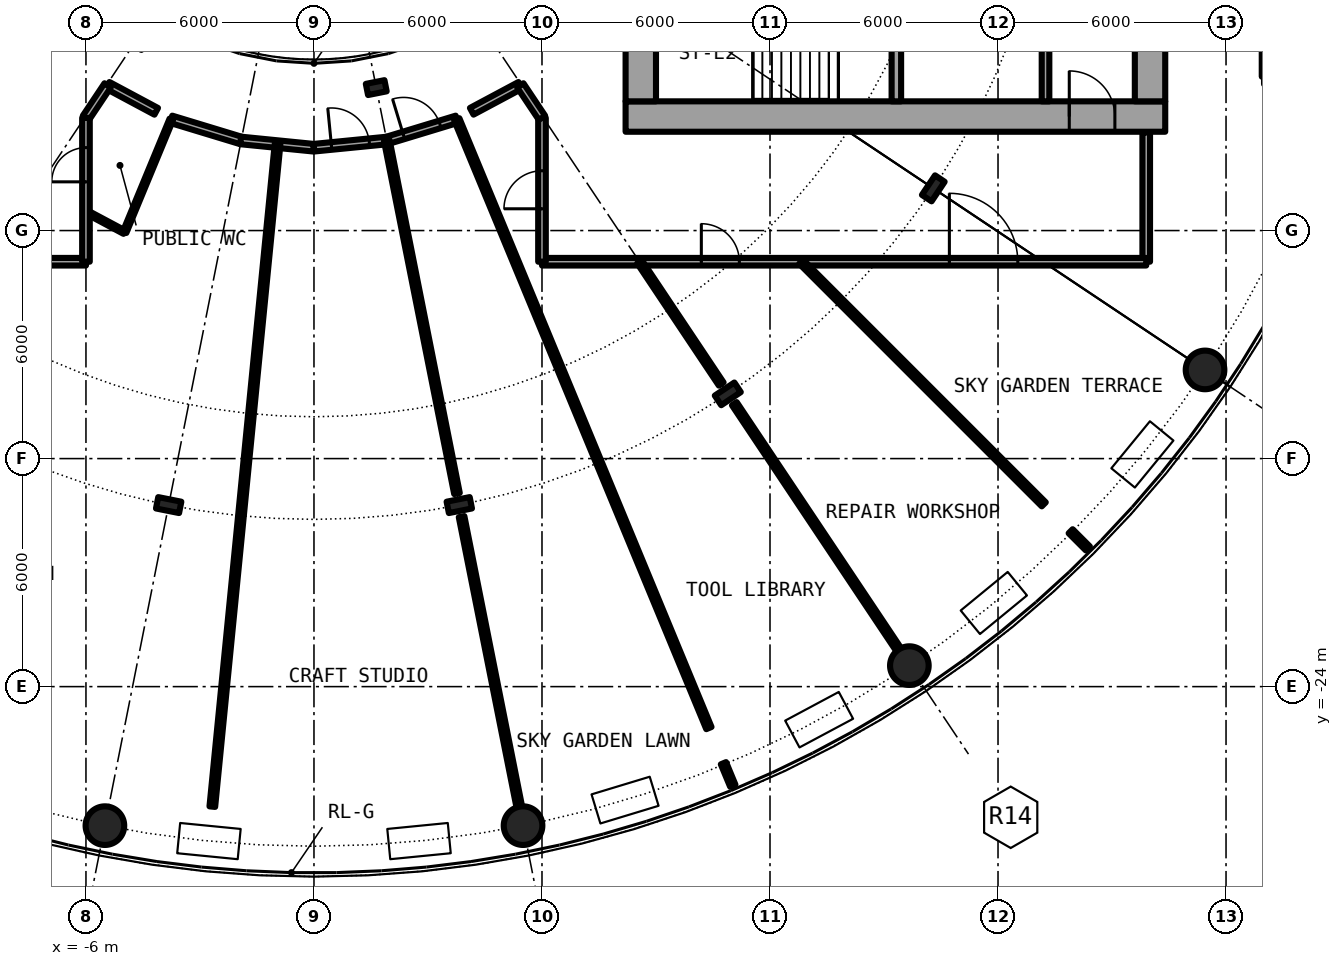
"""IFC4 building model, lengths in metres.
Left out: names, types, materials, properties, quantities, classifications, styles, units other than length and angle.
Written with IfcOpenShell. Run it as: python <this file> out.ifc"""

import sys

from ifc_helpers import new_model, si_unit, direction, frame, frame_2d, origin, origin_2d, place, context, subcontext, project, spatial, rectangle, hollow_circle, i_section, extrude, element, fill, save


model = new_model("IFC4")
c1 = context("Model", 3, precision=1e-05, world=origin(), true_north=direction((0.0, 1.0)))
c2 = subcontext(c1, "Body", "Model", "MODEL_VIEW")
j1 = project(units=[si_unit("LENGTHUNIT", "METRE"), si_unit("PLANEANGLEUNIT", "RADIAN")], contexts=[c1])
p1 = place(None, origin())
s1 = spatial("IfcSite", under=j1, at=p1, CompositionType="ELEMENT")
p2 = place(p1, origin())
s2 = spatial("IfcBuilding", under=s1, at=p2, CompositionType="ELEMENT")
p3 = place(p2, frame((0.0, 0.0, 57.5)))
s3 = spatial("IfcBuildingStorey", under=s2, at=p3, CompositionType="ELEMENT", Elevation=57.5)
for number, where, z_axis, x_axis in (
    (1, (-5.501, -27.658, 0.0), (0.0, 0.0, 1.0), (1.0, 0.0, 0.0)),
    (2, (5.501, -27.658, 0.0), (0.0, 0.0, 1.0), (1.0, 0.0, 0.0)),
    (3, (15.667, -23.448, 0.0), (0.0, 0.0, 1.0), (1.0, 0.0, 0.0)),
    (4, (23.448, -15.667, 0.0), (0.0, 0.0, 1.0), (1.0, 0.0, 0.0)),
):
    element("IfcColumn", number, at=place(p3, frame(where, z_axis=z_axis, x_axis=x_axis)), inside=s3, PredefinedType="COLUMN", context=c2, shape_type="SweptSolid", body=[
        extrude(hollow_circle(Radius=0.508, WallThickness=0.05, at=origin_2d()), origin(), (0.0, 0.0, 1.0), 6.1),
    ])
for number, where, z_axis, x_axis in (
    (5, (-3.824, -19.223, 0.0), (0.0, 0.0, 1.0), (-0.195, -0.981, 0.0)),
    (6, (3.824, -19.223, 0.0), (0.0, 0.0, 1.0), (0.195, -0.981, 0.0)),
    (7, (10.889, -16.297, 0.0), (0.0, 0.0, 1.0), (0.556, -0.831, 0.0)),
    (8, (16.297, -10.889, 0.0), (0.0, 0.0, 1.0), (0.831, -0.556, 0.0)),
):
    element("IfcColumn", number, at=place(p3, frame(where, z_axis=z_axis, x_axis=x_axis)), inside=s3, PredefinedType="COLUMN", context=c2, shape_type="SweptSolid", body=[
        extrude(i_section(OverallWidth=0.305, OverallDepth=0.62, WebThickness=0.021, FlangeThickness=0.04, FilletRadius=0.027, at=origin_2d()), origin(), (0.0, 0.0, 1.0), 6.1),
    ])
p4 = place(p3, frame((1.639, -8.239, 0.0), z_axis=(0.0, 0.0, 1.0), x_axis=(0.195090322016, -0.980785280403, 0.0)))
e9 = element("IfcColumn", 9, at=p4, inside=s3, PredefinedType="COLUMN", context=c2, shape_type="SweptSolid", body=[
    extrude(i_section(OverallWidth=0.3, OverallDepth=0.5, WebThickness=0.014, FlangeThickness=0.028, FilletRadius=0.027, at=origin_2d()), origin(), (0.0, 0.0, 1.0), 6.1),
])
p5 = place(p3, frame((8.2, -9.0, 0.0), z_axis=(0.0, 0.0, 1.0), x_axis=(1.0, 0.0, 0.0)))
e10 = element("IfcWall", 10, at=p5, inside=s3, PredefinedType="SHEAR", context=c2, shape_type="SweptSolid", body=[
    extrude(rectangle(XDim=14.2, YDim=0.8, at=frame_2d((7.1, 0.0))), origin(), (0.0, 0.0, 1.0), 6.1),
])
p6 = place(p5, frame((11.675, 0.0, 0.0)))
e11 = element("IfcOpeningElement", 11, at=p6, cuts=e10, PredefinedType="OPENING", context=c2, shape_type="SweptSolid", body=[
    extrude(rectangle(XDim=1.2, YDim=2.3, at=frame_2d((0.6, 1.15))), frame((0.0, 0.41, 0.0), z_axis=(0.0, -1.0, 0.0), x_axis=(1.0, 0.0, 0.0)), (0.0, 0.0, 1.0), 0.82),
])
p7 = place(p3, frame((22.0, 8.6, 0.0), z_axis=(0.0, 0.0, 1.0), x_axis=(0.0, -1.0, 0.0)))
e12 = element("IfcWall", 12, at=p7, inside=s3, PredefinedType="SHEAR", context=c2, shape_type="SweptSolid", body=[
    extrude(rectangle(XDim=17.2, YDim=0.8, at=frame_2d((8.6, 0.0))), origin(), (0.0, 0.0, 1.0), 6.1),
])
p8 = place(p7, frame((7.4, 0.0, 0.0)))
e13 = element("IfcOpeningElement", 13, at=p8, cuts=e12, PredefinedType="OPENING", context=c2, shape_type="SweptSolid", body=[
    extrude(rectangle(XDim=2.4, YDim=2.3, at=frame_2d((1.2, 1.15))), frame((0.0, 0.41, 0.0), z_axis=(0.0, -1.0, 0.0), x_axis=(1.0, 0.0, 0.0)), (0.0, 0.0, 1.0), 0.82),
])
p9 = place(p3, frame((8.6, -8.6, 0.0), z_axis=(0.0, 0.0, 1.0), x_axis=(0.0, 1.0, 0.0)))
e14 = element("IfcWall", 14, at=p9, inside=s3, PredefinedType="SHEAR", context=c2, shape_type="SweptSolid", body=[
    extrude(rectangle(XDim=17.2, YDim=0.8, at=frame_2d((8.6, 0.0))), origin(), (0.0, 0.0, 1.0), 6.1),
])
p10 = place(p9, frame((7.4, 0.0, 0.1)))
e15 = element("IfcOpeningElement", 15, at=p10, cuts=e14, PredefinedType="OPENING", context=c2, shape_type="SweptSolid", body=[
    extrude(rectangle(XDim=2.4, YDim=2.2, at=frame_2d((1.2, 1.1))), frame((0.0, 0.41, 0.0), z_axis=(0.0, -1.0, 0.0), x_axis=(1.0, 0.0, 0.0)), (0.0, 0.0, 1.0), 0.82),
])
p11 = place(p3, frame((15.325, -8.6, 0.0), z_axis=(0.0, 0.0, 1.0), x_axis=(0.0, 1.0, 0.0)))
e16 = element("IfcWall", 16, at=p11, inside=s3, PredefinedType="SHEAR", context=c2, shape_type="SweptSolid", body=[
    extrude(rectangle(XDim=3.95, YDim=0.25, at=frame_2d((1.975, 0.0))), origin(), (0.0, 0.0, 1.0), 6.1),
])
p12 = place(p11, frame((2.025, 0.0, 0.0)))
e17 = element("IfcOpeningElement", 17, at=p12, cuts=e16, PredefinedType="OPENING", context=c2, shape_type="SweptSolid", body=[
    extrude(rectangle(XDim=1.2, YDim=2.3, at=frame_2d((0.6, 1.15))), frame((0.0, 0.135, 0.0), z_axis=(0.0, -1.0, 0.0), x_axis=(1.0, 0.0, 0.0)), (0.0, 0.0, 1.0), 0.27),
])
p13 = place(p3, frame((19.25, -8.6, 0.0), z_axis=(0.0, 0.0, 1.0), x_axis=(0.0, 1.0, 0.0)))
e18 = element("IfcWall", 18, at=p13, inside=s3, PredefinedType="SOLIDWALL", context=c2, shape_type="SweptSolid", body=[
    extrude(rectangle(XDim=7.025, YDim=0.2, at=frame_2d((3.513, 0.0))), origin(), (0.0, 0.0, 1.0), 5.75),
])
p14 = place(p13, frame((2.35, 0.0, 0.0)))
e19 = element("IfcOpeningElement", 19, at=p14, cuts=e18, PredefinedType="OPENING", context=c2, shape_type="SweptSolid", body=[
    extrude(rectangle(XDim=1.1, YDim=2.3, at=frame_2d((0.55, 1.15))), frame((0.0, 0.11, 0.0), z_axis=(0.0, -1.0, 0.0), x_axis=(1.0, 0.0, 0.0)), (0.0, 0.0, 1.0), 0.22),
])
p15 = place(p3, frame((25.0, -3.5, 0.0), z_axis=(0.0, 0.0, 1.0), x_axis=(0.0, -1.0, 0.0)))
e20 = element("IfcWall", 20, at=p15, inside=s3, PredefinedType="PARTITIONING", context=c2, shape_type="SweptSolid", body=[
    extrude(rectangle(XDim=4.45, YDim=0.12, at=frame_2d((2.225, 0.0))), origin(), (0.0, 0.0, 1.0), 5.75),
])
p16 = place(p15, frame((0.4, 0.0, 0.1)))
e21 = element("IfcOpeningElement", 21, at=p16, cuts=e20, PredefinedType="OPENING", context=c2, shape_type="SweptSolid", body=[
    extrude(rectangle(XDim=3.6, YDim=5.4, at=frame_2d((1.8, 2.7))), frame((0.0, 0.07, 0.0), z_axis=(0.0, -1.0, 0.0), x_axis=(1.0, 0.0, 0.0)), (0.0, 0.0, 1.0), 0.14),
])
p17 = place(p3, frame((21.9, -12.82, 0.0), z_axis=(0.0, 0.0, 1.0), x_axis=(0.0, 1.0, 0.0)))
e22 = element("IfcWall", 22, at=p17, inside=s3, PredefinedType="PARTITIONING", context=c2, shape_type="SweptSolid", body=[
    extrude(rectangle(XDim=3.4, YDim=0.2, at=frame_2d((1.7, 0.0))), origin(), (0.0, 0.0, 1.0), 5.75),
])
p18 = place(p3, frame((-6.0, -11.503, 0.0), z_axis=(0.0, 0.0, 1.0), x_axis=(0.882235076446, -0.470809165042, 0.0)))
e23 = element("IfcWall", 23, at=p18, inside=s3, PredefinedType="PARTITIONING", context=c2, shape_type="SweptSolid", body=[
    extrude(rectangle(XDim=1.147, YDim=0.1, at=frame_2d((0.573, 0.0))), origin(), (0.0, 0.0, 1.0), 5.75),
])
p19 = place(p3, frame((-21.9, -12.82, 0.0), z_axis=(0.0, 0.0, 1.0), x_axis=(1.0, 0.0, 0.0)))
e24 = element("IfcWall", 24, at=p19, inside=s3, PredefinedType="PARTITIONING", context=c2, shape_type="SweptSolid", body=[
    extrude(rectangle(XDim=15.9, YDim=0.2, at=frame_2d((7.95, 0.0))), origin(), (0.0, 0.0, 1.0), 5.75),
])
p20 = place(p19, frame((11.99, 0.0, 0.0)))
e25 = element("IfcOpeningElement", 25, at=p20, cuts=e24, PredefinedType="OPENING", context=c2, shape_type="SweptSolid", body=[
    extrude(rectangle(XDim=1.0, YDim=2.3, at=frame_2d((0.5, 1.15))), frame((0.0, 0.11, 0.0), z_axis=(0.0, -1.0, 0.0), x_axis=(1.0, 0.0, 0.0)), (0.0, 0.0, 1.0), 0.22),
])
p21 = place(p19, frame((3.464, 0.0, 0.0)))
e26 = element("IfcOpeningElement", 26, at=p21, cuts=e24, PredefinedType="OPENING", context=c2, shape_type="SweptSolid", body=[
    extrude(rectangle(XDim=1.8, YDim=2.3, at=frame_2d((0.9, 1.15))), frame((0.0, 0.11, 0.0), z_axis=(0.0, -1.0, 0.0), x_axis=(1.0, 0.0, 0.0)), (0.0, 0.0, 1.0), 0.22),
])
p22 = place(p3, frame((6.0, -12.82, 0.0), z_axis=(0.0, 0.0, 1.0), x_axis=(1.0, 0.0, 0.0)))
e27 = element("IfcWall", 27, at=p22, inside=s3, PredefinedType="PARTITIONING", context=c2, shape_type="SweptSolid", body=[
    extrude(rectangle(XDim=15.9, YDim=0.2, at=frame_2d((7.95, 0.0))), origin(), (0.0, 0.0, 1.0), 5.75),
])
p23 = place(p22, frame((4.193, 0.0, 0.0)))
e28 = element("IfcOpeningElement", 28, at=p23, cuts=e27, PredefinedType="OPENING", context=c2, shape_type="SweptSolid", body=[
    extrude(rectangle(XDim=1.0, YDim=2.3, at=frame_2d((0.5, 1.15))), frame((0.0, 0.11, 0.0), z_axis=(0.0, -1.0, 0.0), x_axis=(1.0, 0.0, 0.0)), (0.0, 0.0, 1.0), 0.22),
])
p24 = place(p22, frame((10.72, 0.0, 0.0)))
e29 = element("IfcOpeningElement", 29, at=p24, cuts=e27, PredefinedType="OPENING", context=c2, shape_type="SweptSolid", body=[
    extrude(rectangle(XDim=1.8, YDim=2.3, at=frame_2d((0.9, 1.15))), frame((0.0, 0.11, 0.0), z_axis=(0.0, -1.0, 0.0), x_axis=(1.0, 0.0, 0.0)), (0.0, 0.0, 1.0), 0.22),
])
p25 = place(p3, frame((-5.429, -8.179, 0.0), z_axis=(0.0, 0.0, 1.0), x_axis=(0.881652665802, -0.471898905364, 0.0)))
e30 = element("IfcWall", 30, at=p25, inside=s3, PredefinedType="PARTITIONING", context=c2, shape_type="SweptSolid", body=[
    extrude(rectangle(XDim=1.45, YDim=0.2, at=frame_2d((0.725, 0.0))), origin(), (0.0, 0.0, 1.0), 5.75),
])
p26 = place(p3, frame((-3.758, -9.072, 0.0), z_axis=(0.0, 0.0, 1.0), x_axis=(0.956896312675, -0.29042976223, 0.0)))
e31 = element("IfcWall", 31, at=p26, inside=s3, PredefinedType="PARTITIONING", context=c2, shape_type="SweptSolid", body=[
    extrude(rectangle(XDim=1.925, YDim=0.2, at=frame_2d((0.962, 0.0))), origin(), (0.0, 0.0, 1.0), 5.75),
])
p27 = place(p3, frame((-1.929, -9.629, 0.0), z_axis=(0.0, 0.0, 1.0), x_axis=(0.995059761059, -0.09927775139, 0.0)))
e32 = element("IfcWall", 32, at=p27, inside=s3, PredefinedType="PARTITIONING", context=c2, shape_type="SweptSolid", body=[
    extrude(rectangle(XDim=1.926, YDim=0.2, at=frame_2d((0.963, 0.0))), origin(), (0.0, 0.0, 1.0), 5.75),
])
p28 = place(p3, frame((0.0, -9.82, 0.0), z_axis=(0.0, 0.0, 1.0), x_axis=(0.995171860647, 0.098147683504, 0.0)))
e33 = element("IfcWall", 33, at=p28, inside=s3, PredefinedType="PARTITIONING", context=c2, shape_type="SweptSolid", body=[
    extrude(rectangle(XDim=1.925, YDim=0.2, at=frame_2d((0.963, 0.0))), origin(), (0.0, 0.0, 1.0), 5.75),
])
p29 = place(p28, frame((0.463, 0.0, 0.0)))
e34 = element("IfcOpeningElement", 34, at=p29, cuts=e33, PredefinedType="OPENING", context=c2, shape_type="SweptSolid", body=[
    extrude(rectangle(XDim=1.0, YDim=2.3, at=frame_2d((0.5, 1.15))), frame((0.0, 0.11, 0.0), z_axis=(0.0, -1.0, 0.0), x_axis=(1.0, 0.0, 0.0)), (0.0, 0.0, 1.0), 0.22),
])
p30 = place(p3, frame((1.916, -9.631, 0.0), z_axis=(0.0, 0.0, 1.0), x_axis=(0.956896312675, 0.29042976223, 0.0)))
e35 = element("IfcWall", 35, at=p30, inside=s3, PredefinedType="PARTITIONING", context=c2, shape_type="SweptSolid", body=[
    extrude(rectangle(XDim=1.925, YDim=0.2, at=frame_2d((0.962, 0.0))), origin(), (0.0, 0.0, 1.0), 5.75),
])
p31 = place(p30, frame((0.462, 0.0, 0.0)))
e36 = element("IfcOpeningElement", 36, at=p31, cuts=e35, PredefinedType="OPENING", context=c2, shape_type="SweptSolid", body=[
    extrude(rectangle(XDim=1.0, YDim=2.3, at=frame_2d((0.5, 1.15))), frame((0.0, 0.11, 0.0), z_axis=(0.0, -1.0, 0.0), x_axis=(1.0, 0.0, 0.0)), (0.0, 0.0, 1.0), 0.22),
])
p32 = place(p3, frame((4.151, -8.862, 0.0), z_axis=(0.0, 0.0, 1.0), x_axis=(0.88193287619, 0.471375011954, 0.0)))
e37 = element("IfcWall", 37, at=p32, inside=s3, PredefinedType="PARTITIONING", context=c2, shape_type="SweptSolid", body=[
    extrude(rectangle(XDim=1.449, YDim=0.2, at=frame_2d((0.725, 0.0))), origin(), (0.0, 0.0, 1.0), 5.75),
])
p33 = place(p3, frame((6.0, -12.82, 0.0), z_axis=(0.0, 0.0, 1.0), x_axis=(0.0, 1.0, 0.0)))
e38 = element("IfcWall", 38, at=p33, inside=s3, PredefinedType="PARTITIONING", context=c2, shape_type="SweptSolid", body=[
    extrude(rectangle(XDim=3.786, YDim=0.2, at=frame_2d((1.893, 0.0))), origin(), (0.0, 0.0, 1.0), 5.75),
])
p34 = place(p33, frame((1.393, 0.0, 0.0)))
e39 = element("IfcOpeningElement", 39, at=p34, cuts=e38, PredefinedType="OPENING", context=c2, shape_type="SweptSolid", body=[
    extrude(rectangle(XDim=1.0, YDim=2.3, at=frame_2d((0.5, 1.15))), frame((0.0, 0.11, 0.0), z_axis=(0.0, -1.0, 0.0), x_axis=(1.0, 0.0, 0.0)), (0.0, 0.0, 1.0), 0.22),
])
for number, where, z_axis, x_axis in (
    (40, (-6.0, -9.034, 0.0), (0.0, 0.0, 1.0), (0.555, 0.832, 0.0)),
    (41, (5.429, -8.179, 0.0), (0.0, 0.0, 1.0), (0.555, -0.832, 0.0)),
):
    element("IfcWall", number, at=place(p3, frame(where, z_axis=z_axis, x_axis=x_axis)), inside=s3, PredefinedType="PARTITIONING", context=c2, shape_type="SweptSolid", body=[
        extrude(rectangle(XDim=1.028, YDim=0.2, at=frame_2d((0.514, 0.0))), origin(), (0.0, 0.0, 1.0), 5.75),
    ])
p35 = place(p3, frame((-4.984, -12.045, 0.0), z_axis=(0.0, 0.0, 1.0), x_axis=(0.382517205945, 0.923948368231, 0.0)))
e42 = element("IfcWall", 42, at=p35, inside=s3, PredefinedType="PARTITIONING", context=c2, shape_type="SweptSolid", body=[
    extrude(rectangle(XDim=3.216, YDim=0.1, at=frame_2d((1.608, 0.0))), origin(), (0.0, 0.0, 1.0), 5.75),
])
p36 = place(p3, frame((-2.675, -27.158, 0.0), z_axis=(0.0, 0.0, 1.0), x_axis=(0.098025634079, 0.995183890074, 0.0)))
e43 = element("IfcWall", 43, at=p36, inside=s3, PredefinedType="PARTITIONING", context=c2, shape_type="SweptSolid", body=[
    extrude(rectangle(XDim=17.516, YDim=0.15, at=frame_2d((8.758, 0.0))), origin(), (0.0, 0.0, 1.0), 5.75),
])
p37 = place(p3, frame((1.916, -9.631, 0.0), z_axis=(0.0, 0.0, 1.0), x_axis=(0.195035186511, -0.980796245926, 0.0)))
e44 = element("IfcWall", 44, at=p37, inside=s3, PredefinedType="PARTITIONING", context=c2, shape_type="SweptSolid", body=[
    extrude(rectangle(XDim=9.47, YDim=0.15, at=frame_2d((4.735, 0.0))), origin(), (0.0, 0.0, 1.0), 5.75),
])
p38 = place(p3, frame((3.757, -9.072, 0.0), z_axis=(0.0, 0.0, 1.0), x_axis=(0.382668905709, -0.923885549516, 0.0)))
e45 = element("IfcWall", 45, at=p38, inside=s3, PredefinedType="PARTITIONING", context=c2, shape_type="SweptSolid", body=[
    extrude(rectangle(XDim=17.339, YDim=0.15, at=frame_2d((8.669, 0.0))), origin(), (0.0, 0.0, 1.0), 5.75),
])
p39 = place(p3, frame((3.884, -19.527, 0.0), z_axis=(0.0, 0.0, 1.0), x_axis=(0.195085619607, -0.980786215759, 0.0)))
e46 = element("IfcWall", 46, at=p39, inside=s3, PredefinedType="PARTITIONING", context=c2, shape_type="SweptSolid", body=[
    extrude(rectangle(XDim=7.792, YDim=0.15, at=frame_2d((3.896, 0.0))), origin(), (0.0, 0.0, 1.0), 5.75),
])
p40 = place(p3, frame((8.566, -12.82, 0.0), z_axis=(0.0, 0.0, 1.0), x_axis=(0.55561664662, -0.831438597853, 0.0)))
e47 = element("IfcWall", 47, at=p40, inside=s3, PredefinedType="PARTITIONING", context=c2, shape_type="SweptSolid", body=[
    extrude(rectangle(XDim=3.872, YDim=0.15, at=frame_2d((1.936, 0.0))), origin(), (0.0, 0.0, 1.0), 5.75),
])
p41 = place(p3, frame((10.775, -26.015, 0.0), z_axis=(0.0, 0.0, 1.0), x_axis=(0.383291989612, -0.923627224967, 0.0)))
e48 = element("IfcWall", 48, at=p41, inside=s3, PredefinedType="PARTITIONING", context=c2, shape_type="SweptSolid", body=[
    extrude(rectangle(XDim=0.642, YDim=0.15, at=frame_2d((0.321, 0.0))), origin(), (0.0, 0.0, 1.0), 5.75),
])
p42 = place(p3, frame((11.061, -16.555, 0.0), z_axis=(0.0, 0.0, 1.0), x_axis=(0.555603767829, -0.831447204081, 0.0)))
e49 = element("IfcWall", 49, at=p42, inside=s3, PredefinedType="PARTITIONING", context=c2, shape_type="SweptSolid", body=[
    extrude(rectangle(XDim=7.791, YDim=0.15, at=frame_2d((3.896, 0.0))), origin(), (0.0, 0.0, 1.0), 5.75),
])
p43 = place(p3, frame((12.82, -12.82, 0.0), z_axis=(0.0, 0.0, 1.0), x_axis=(0.707106781187, -0.707106781187, 0.0)))
e50 = element("IfcWall", 50, at=p43, inside=s3, PredefinedType="PARTITIONING", context=c2, shape_type="SweptSolid", body=[
    extrude(rectangle(XDim=9.028, YDim=0.15, at=frame_2d((4.514, 0.0))), origin(), (0.0, 0.0, 1.0), 5.75),
])
p44 = place(p3, frame((19.911, -19.911, 0.0), z_axis=(0.0, 0.0, 1.0), x_axis=(0.707106781187, -0.707106781187, 0.0)))
e51 = element("IfcWall", 51, at=p44, inside=s3, PredefinedType="PARTITIONING", context=c2, shape_type="SweptSolid", body=[
    extrude(rectangle(XDim=0.642, YDim=0.15, at=frame_2d((0.321, 0.0))), origin(), (0.0, 0.0, 1.0), 5.75),
])
p45 = place(p3, frame((-6.0, -12.82, 0.0), z_axis=(0.0, 0.0, 1.0), x_axis=(0.0, 1.0, 0.0)))
e52 = element("IfcWall", 52, at=p45, inside=s3, PredefinedType="PARTITIONING", context=c2, shape_type="SweptSolid", body=[
    extrude(rectangle(XDim=3.786, YDim=0.2, at=frame_2d((1.893, 0.0))), origin(), (0.0, 0.0, 1.0), 5.75),
])
p46 = place(p45, frame((2.102, 0.0, 0.0)))
e53 = element("IfcOpeningElement", 53, at=p46, cuts=e52, PredefinedType="OPENING", context=c2, shape_type="SweptSolid", body=[
    extrude(rectangle(XDim=0.9, YDim=2.3, at=frame_2d((0.45, 1.15))), frame((0.0, 0.11, 0.0), z_axis=(0.0, -1.0, 0.0), x_axis=(1.0, 0.0, 0.0)), (0.0, 0.0, 1.0), 0.22),
])
p47 = place(p6, origin())
e54 = element("IfcDoor", 54, at=p47, inside=s3, OperationType="SINGLE_SWING_LEFT", PredefinedType="DOOR", context=c2, shape_type="SweptSolid", body=[
    extrude(rectangle(XDim=1.2, YDim=2.3, at=frame_2d((0.6, 1.15))), frame((0.0, 0.025, 0.0), z_axis=(0.0, -1.0, 0.0), x_axis=(1.0, 0.0, 0.0)), (0.0, 0.0, 1.0), 0.05),
])
fill(e11, e54)
p48 = place(p46, origin())
e55 = element("IfcDoor", 55, at=p48, inside=s3, OperationType="SINGLE_SWING_RIGHT", PredefinedType="DOOR", context=c2, shape_type="SweptSolid", body=[
    extrude(rectangle(XDim=0.9, YDim=2.3, at=frame_2d((0.45, 1.15))), frame((0.0, 0.025, 0.0), z_axis=(0.0, -1.0, 0.0), x_axis=(1.0, 0.0, 0.0)), (0.0, 0.0, 1.0), 0.05),
])
fill(e53, e55)
p49 = place(p29, origin())
e56 = element("IfcDoor", 56, at=p49, inside=s3, OperationType="SINGLE_SWING_LEFT", PredefinedType="DOOR", context=c2, shape_type="SweptSolid", body=[
    extrude(rectangle(XDim=1.0, YDim=2.3, at=frame_2d((0.5, 1.15))), frame((0.0, 0.025, 0.0), z_axis=(0.0, -1.0, 0.0), x_axis=(1.0, 0.0, 0.0)), (0.0, 0.0, 1.0), 0.05),
])
fill(e34, e56)
p50 = place(p34, origin())
e57 = element("IfcDoor", 57, at=p50, inside=s3, OperationType="SINGLE_SWING_RIGHT", PredefinedType="DOOR", context=c2, shape_type="SweptSolid", body=[
    extrude(rectangle(XDim=1.0, YDim=2.3, at=frame_2d((0.5, 1.15))), frame((0.0, 0.025, 0.0), z_axis=(0.0, -1.0, 0.0), x_axis=(1.0, 0.0, 0.0)), (0.0, 0.0, 1.0), 0.05),
])
fill(e39, e57)
p51 = place(p23, origin())
e58 = element("IfcDoor", 58, at=p51, inside=s3, OperationType="SINGLE_SWING_LEFT", PredefinedType="DOOR", context=c2, shape_type="SweptSolid", body=[
    extrude(rectangle(XDim=1.0, YDim=2.3, at=frame_2d((0.5, 1.15))), frame((0.0, 0.025, 0.0), z_axis=(0.0, -1.0, 0.0), x_axis=(1.0, 0.0, 0.0)), (0.0, 0.0, 1.0), 0.05),
])
fill(e28, e58)
p52 = place(p31, origin())
e59 = element("IfcDoor", 59, at=p52, inside=s3, OperationType="SINGLE_SWING_LEFT", PredefinedType="DOOR", context=c2, shape_type="SweptSolid", body=[
    extrude(rectangle(XDim=1.0, YDim=2.3, at=frame_2d((0.5, 1.15))), frame((0.0, 0.025, 0.0), z_axis=(0.0, -1.0, 0.0), x_axis=(1.0, 0.0, 0.0)), (0.0, 0.0, 1.0), 0.05),
])
fill(e36, e59)
p53 = place(p24, origin())
e60 = element("IfcDoor", 60, at=p53, inside=s3, OperationType="DOUBLE_DOOR_SINGLE_SWING", PredefinedType="DOOR", context=c2, shape_type="SweptSolid", body=[
    extrude(rectangle(XDim=1.8, YDim=2.3, at=frame_2d((0.9, 1.15))), frame((0.0, 0.025, 0.0), z_axis=(0.0, -1.0, 0.0), x_axis=(1.0, 0.0, 0.0)), (0.0, 0.0, 1.0), 0.05),
])
fill(e29, e60)
save(model, sys.argv[1])
